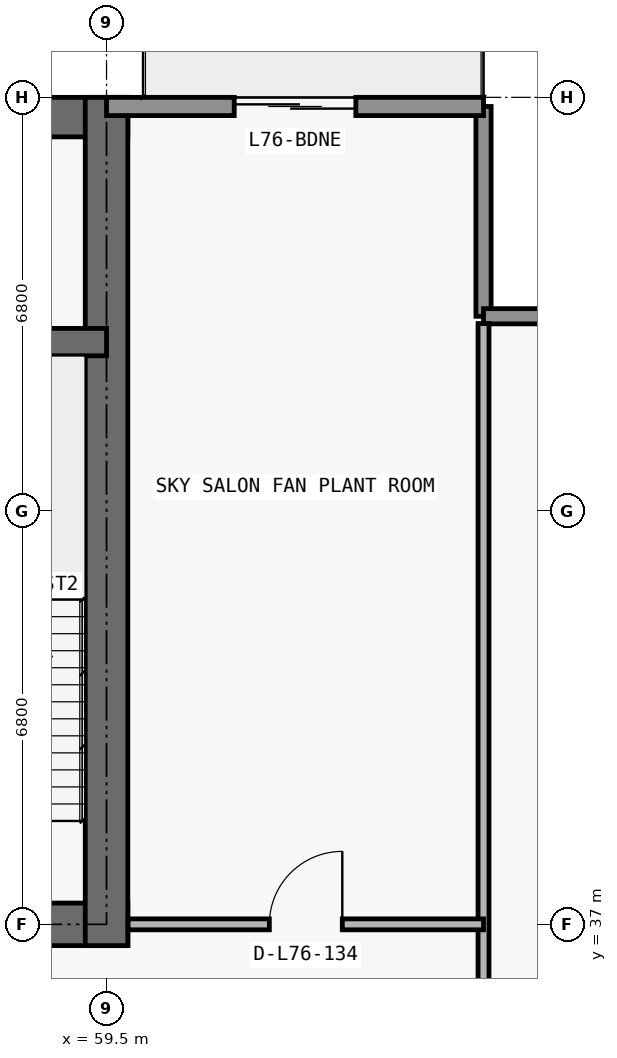
"""IFC4 building model, lengths in metres.
Left out: names, types, materials, properties, quantities, classifications, styles, units other than length and angle.
Written with IfcOpenShell. Run it as: python <this file> out.ifc"""

import sys

from ifc_helpers import new_model, si_unit, direction, frame, frame_2d, origin, place, context, subcontext, project, spatial, rectangle, extrude, element, fill, save


model = new_model("IFC4")
c1 = context("Model", 3, precision=1e-05, world=origin(), true_north=direction((0.0, 1.0)))
c2 = subcontext(c1, "Body", "Model", "MODEL_VIEW")
j1 = project(units=[si_unit("LENGTHUNIT", "METRE"), si_unit("PLANEANGLEUNIT", "RADIAN")], contexts=[c1])
p1 = place(None, origin())
s1 = spatial("IfcSite", under=j1, at=p1, CompositionType="ELEMENT")
p2 = place(p1, origin())
s2 = spatial("IfcBuilding", under=s1, at=p2, CompositionType="ELEMENT")
p3 = place(p2, frame((0.0, 0.0, 269.4)))
s3 = spatial("IfcBuildingStorey", under=s2, at=p3, CompositionType="ELEMENT", Elevation=269.4)
p4 = place(p3, frame((17.95, 37.0, 0.0), z_axis=(0.0, 0.0, 1.0), x_axis=(1.0, 0.0, 0.0)))
e1 = element("IfcWall", 1, at=p4, inside=s3, PredefinedType="SHEAR", context=c2, shape_type="SweptSolid", body=[
    extrude(rectangle(XDim=41.9, YDim=0.7, at=frame_2d((20.95, 0.0))), origin(), (0.0, 0.0, 1.0), 4.5),
])
p5 = place(p4, frame((14.35, 0.0, 0.0)))
e2 = element("IfcOpeningElement", 2, at=p5, cuts=e1, PredefinedType="OPENING", context=c2, shape_type="SweptSolid", body=[
    extrude(rectangle(XDim=1.1, YDim=2.15, at=frame_2d((0.55, 1.075))), frame((0.0, 0.36, 0.0), z_axis=(0.0, -1.0, 0.0), x_axis=(1.0, 0.0, 0.0)), (0.0, 0.0, 1.0), 0.72),
])
p6 = place(p4, frame((6.2, 0.0, 0.0)))
e3 = element("IfcOpeningElement", 3, at=p6, cuts=e1, PredefinedType="OPENING", context=c2, shape_type="SweptSolid", body=[
    extrude(rectangle(XDim=1.05, YDim=2.15, at=frame_2d((0.525, 1.075))), frame((0.0, 0.36, 0.0), z_axis=(0.0, -1.0, 0.0), x_axis=(1.0, 0.0, 0.0)), (0.0, 0.0, 1.0), 0.72),
])
p7 = place(p4, frame((34.7, 0.0, 0.0)))
e4 = element("IfcOpeningElement", 4, at=p7, cuts=e1, PredefinedType="OPENING", context=c2, shape_type="SweptSolid", body=[
    extrude(rectangle(XDim=1.05, YDim=2.15, at=frame_2d((0.525, 1.075))), frame((0.0, 0.36, 0.0), z_axis=(0.0, -1.0, 0.0), x_axis=(1.0, 0.0, 0.0)), (0.0, 0.0, 1.0), 0.72),
])
p8 = place(p4, frame((10.812, 0.0, 0.0)))
e5 = element("IfcOpeningElement", 5, at=p8, cuts=e1, PredefinedType="OPENING", context=c2, shape_type="SweptSolid", body=[
    extrude(rectangle(XDim=1.05, YDim=2.15, at=frame_2d((0.525, 1.075))), frame((0.0, 0.36, 0.0), z_axis=(0.0, -1.0, 0.0), x_axis=(1.0, 0.0, 0.0)), (0.0, 0.0, 1.0), 0.72),
])
p9 = place(p4, frame((24.05, 0.0, 0.0)))
e6 = element("IfcOpeningElement", 6, at=p9, cuts=e1, PredefinedType="OPENING", context=c2, shape_type="SweptSolid", body=[
    extrude(rectangle(XDim=1.05, YDim=2.15, at=frame_2d((0.525, 1.075))), frame((0.0, 0.36, 0.0), z_axis=(0.0, -1.0, 0.0), x_axis=(1.0, 0.0, 0.0)), (0.0, 0.0, 1.0), 0.72),
])
p10 = place(p3, frame((17.95, 50.275, 0.0), z_axis=(0.0, 0.0, 1.0), x_axis=(1.0, 0.0, 0.0)))
e7 = element("IfcWall", 7, at=p10, inside=s3, PredefinedType="SHEAR", context=c2, shape_type="SweptSolid", body=[
    extrude(rectangle(XDim=41.9, YDim=0.65, at=frame_2d((20.95, 0.0))), origin(), (0.0, 0.0, 1.0), 4.5),
])
p11 = place(p3, frame((59.5, 36.65, 0.0), z_axis=(0.0, 0.0, 1.0), x_axis=(0.0, 1.0, 0.0)))
e8 = element("IfcWall", 8, at=p11, inside=s3, PredefinedType="SHEAR", context=c2, shape_type="SweptSolid", body=[
    extrude(rectangle(XDim=13.95, YDim=0.7, at=frame_2d((6.975, 0.0))), origin(), (0.0, 0.0, 1.0), 4.5),
])
p12 = place(p3, frame((18.3, 46.575, 0.0), z_axis=(0.0, 0.0, 1.0), x_axis=(1.0, 0.0, 0.0)))
e9 = element("IfcWall", 9, at=p12, inside=s3, PredefinedType="SHEAR", context=c2, shape_type="SweptSolid", body=[
    extrude(rectangle(XDim=41.2, YDim=0.45, at=frame_2d((20.6, 0.0))), origin(), (0.0, 0.0, 1.0), 4.5),
])
p13 = place(p12, frame((7.575, 0.0, 0.0)))
e10 = element("IfcOpeningElement", 10, at=p13, cuts=e9, PredefinedType="OPENING", context=c2, shape_type="SweptSolid", body=[
    extrude(rectangle(XDim=1.05, YDim=2.15, at=frame_2d((0.525, 1.075))), frame((0.0, 0.235, 0.0), z_axis=(0.0, -1.0, 0.0), x_axis=(1.0, 0.0, 0.0)), (0.0, 0.0, 1.0), 0.47),
])
p14 = place(p12, frame((32.625, 0.0, 0.0)))
e11 = element("IfcOpeningElement", 11, at=p14, cuts=e9, PredefinedType="OPENING", context=c2, shape_type="SweptSolid", body=[
    extrude(rectangle(XDim=1.05, YDim=2.15, at=frame_2d((0.525, 1.075))), frame((0.0, 0.235, 0.0), z_axis=(0.0, -1.0, 0.0), x_axis=(1.0, 0.0, 0.0)), (0.0, 0.0, 1.0), 0.47),
])
p15 = place(p3, frame((65.7, 50.45, 0.0), z_axis=(0.0, 0.0, 1.0), x_axis=(0.0, -1.0, 0.0)))
e12 = element("IfcWall", 12, at=p15, inside=s3, PredefinedType="ELEMENTEDWALL", context=c2, shape_type="SweptSolid", body=[
    extrude(rectangle(XDim=3.45, YDim=0.25, at=frame_2d((1.725, 0.0))), origin(), (0.0, 0.0, 1.0), 4.5),
])
p16 = place(p3, frame((65.7, 47.0, 0.0), z_axis=(0.0, 0.0, 1.0), x_axis=(1.0, 0.0, 0.0)))
e13 = element("IfcWall", 13, at=p16, inside=s3, PredefinedType="ELEMENTEDWALL", context=c2, shape_type="SweptSolid", body=[
    extrude(rectangle(XDim=3.85, YDim=0.25, at=frame_2d((1.925, 0.0))), origin(), (0.0, 0.0, 1.0), 4.5),
])
p17 = place(p3, frame((59.5, 50.45, 0.0), z_axis=(0.0, 0.0, 1.0), x_axis=(1.0, 0.0, 0.0)))
e14 = element("IfcWall", 14, at=p17, inside=s3, PredefinedType="STANDARD", context=c2, shape_type="SweptSolid", body=[
    extrude(rectangle(XDim=6.2, YDim=0.3, at=frame_2d((3.1, 0.0))), origin(), (0.0, 0.0, 1.0), 4.5),
])
p18 = place(p17, frame((2.1, 0.0, 0.0)))
e15 = element("IfcOpeningElement", 15, at=p18, cuts=e14, PredefinedType="OPENING", context=c2, shape_type="SweptSolid", body=[
    extrude(rectangle(XDim=2.0, YDim=2.3, at=frame_2d((1.0, 1.15))), frame((0.0, 0.16, 0.0), z_axis=(0.0, -1.0, 0.0), x_axis=(1.0, 0.0, 0.0)), (0.0, 0.0, 1.0), 0.32),
])
p19 = place(p3, frame((65.7, 13.42, 0.0), z_axis=(0.0, 0.0, 1.0), x_axis=(0.0, 1.0, 0.0)))
e16 = element("IfcWall", 16, at=p19, inside=s3, PredefinedType="PARTITIONING", context=c2, shape_type="SweptSolid", body=[
    extrude(rectangle(XDim=33.46, YDim=0.18, at=frame_2d((16.73, 0.0))), origin(), (0.0, 0.0, 1.0), 4.5),
])
p20 = place(p3, frame((59.855, 37.0, 0.0), z_axis=(0.0, 0.0, 1.0), x_axis=(1.0, 0.0, 0.0)))
e17 = element("IfcWall", 17, at=p20, inside=s3, PredefinedType="PARTITIONING", context=c2, shape_type="SweptSolid", body=[
    extrude(rectangle(XDim=5.845, YDim=0.18, at=frame_2d((2.922, 0.0))), origin(), (0.0, 0.0, 1.0), 4.5),
])
p21 = place(p20, frame((2.323, 0.0, 0.0)))
e18 = element("IfcOpeningElement", 18, at=p21, cuts=e17, PredefinedType="OPENING", context=c2, shape_type="SweptSolid", body=[
    extrude(rectangle(XDim=1.2, YDim=2.2, at=frame_2d((0.6, 1.1))), frame((0.0, 0.1, 0.0), z_axis=(0.0, -1.0, 0.0), x_axis=(1.0, 0.0, 0.0)), (0.0, 0.0, 1.0), 0.2),
])
p22 = place(p18, origin())
e19 = element("IfcDoor", 19, at=p22, inside=s3, OperationType="DOUBLE_DOOR_SLIDING", PredefinedType="DOOR", context=c2, shape_type="SweptSolid", body=[
    extrude(rectangle(XDim=2.0, YDim=2.3, at=frame_2d((1.0, 1.15))), frame((0.0, 0.025, 0.0), z_axis=(0.0, -1.0, 0.0), x_axis=(1.0, 0.0, 0.0)), (0.0, 0.0, 1.0), 0.05),
])
fill(e15, e19)
p23 = place(p21, origin())
e20 = element("IfcDoor", 20, at=p23, inside=s3, OperationType="SINGLE_SWING_RIGHT", PredefinedType="DOOR", context=c2, shape_type="SweptSolid", body=[
    extrude(rectangle(XDim=1.2, YDim=2.2, at=frame_2d((0.6, 1.1))), frame((0.0, 0.025, 0.0), z_axis=(0.0, -1.0, 0.0), x_axis=(1.0, 0.0, 0.0)), (0.0, 0.0, 1.0), 0.05),
])
fill(e18, e20)
save(model, sys.argv[1])
